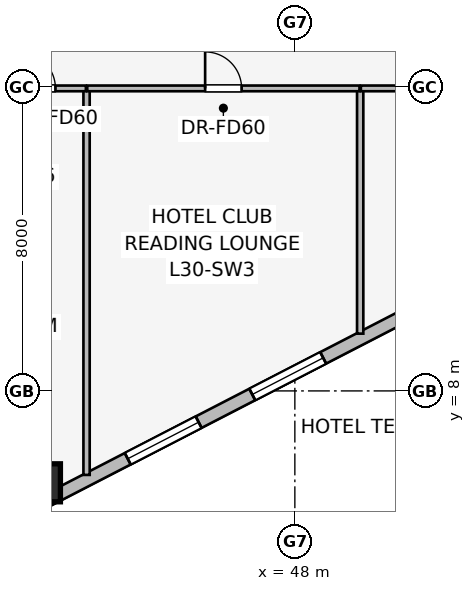
"""IFC4 building model, lengths in metres.
Left out: names, types, materials, properties, quantities, classifications, styles, units other than length and angle.
Written with IfcOpenShell. Run it as: python <this file> out.ifc"""

import sys

from ifc_helpers import new_model, si_unit, direction, frame, frame_2d, origin, origin_2d, place, context, subcontext, project, spatial, rectangle, extrude, element, fill, save


model = new_model("IFC4")
c1 = context("Model", 3, precision=1e-05, world=origin(), true_north=direction((0.0, 1.0)))
c2 = subcontext(c1, "Body", "Model", "MODEL_VIEW")
j1 = project(units=[si_unit("LENGTHUNIT", "METRE"), si_unit("PLANEANGLEUNIT", "RADIAN")], contexts=[c1])
p1 = place(None, origin())
s1 = spatial("IfcSite", under=j1, at=p1, CompositionType="ELEMENT")
p2 = place(p1, origin())
s2 = spatial("IfcBuilding", under=s1, at=p2, CompositionType="ELEMENT")
p3 = place(p2, frame((0.0, 0.0, 115.35)))
s3 = spatial("IfcBuildingStorey", under=s2, at=p3, CompositionType="ELEMENT", Elevation=115.35)
p4 = place(p3, frame((41.331, 5.582, 0.0), z_axis=(0.0, 0.0, 1.0), x_axis=(1.0, 0.0, 0.0)))
e1 = element("IfcColumn", 1, at=p4, inside=s3, PredefinedType="COLUMN", context=c2, shape_type="SweptSolid", body=[
    extrude(rectangle(XDim=1.0, YDim=1.0, at=origin_2d()), origin(), (0.0, 0.0, 1.0), 3.45),
])
p5 = place(p3, frame((54.831, 12.01, 0.0), z_axis=(0.0, 0.0, 1.0), x_axis=(-0.888613612362, -0.458656568606, 0.0)))
e2 = element("IfcWall", 2, at=p5, inside=s3, PredefinedType="STANDARD", context=c2, shape_type="SweptSolid", body=[
    extrude(rectangle(XDim=18.681, YDim=0.34, at=frame_2d((9.34, 0.0))), origin(), (0.0, 0.0, 1.0), 3.16),
])
p6 = place(p5, frame((1.023, 0.0, 0.75)))
e3 = element("IfcOpeningElement", 3, at=p6, cuts=e2, PredefinedType="OPENING", context=c2, shape_type="SweptSolid", body=[
    extrude(rectangle(XDim=1.6, YDim=1.55, at=frame_2d((0.8, 0.775))), frame((0.0, 0.18, 0.0), z_axis=(0.0, -1.0, 0.0), x_axis=(1.0, 0.0, 0.0)), (0.0, 0.0, 1.0), 0.36),
])
p7 = place(p5, frame((6.848, 0.0, 0.75)))
e4 = element("IfcOpeningElement", 4, at=p7, cuts=e2, PredefinedType="OPENING", context=c2, shape_type="SweptSolid", body=[
    extrude(rectangle(XDim=2.1, YDim=1.5, at=frame_2d((1.05, 0.75))), frame((0.0, 0.18, 0.0), z_axis=(0.0, -1.0, 0.0), x_axis=(1.0, 0.0, 0.0)), (0.0, 0.0, 1.0), 0.36),
])
p8 = place(p5, frame((10.536, 0.0, 0.75)))
e5 = element("IfcOpeningElement", 5, at=p8, cuts=e2, PredefinedType="OPENING", context=c2, shape_type="SweptSolid", body=[
    extrude(rectangle(XDim=2.1, YDim=1.5, at=frame_2d((1.05, 0.75))), frame((0.0, 0.18, 0.0), z_axis=(0.0, -1.0, 0.0), x_axis=(1.0, 0.0, 0.0)), (0.0, 0.0, 1.0), 0.36),
])
p9 = place(p5, frame((16.058, 0.0, 0.75)))
e6 = element("IfcOpeningElement", 6, at=p9, cuts=e2, PredefinedType="OPENING", context=c2, shape_type="SweptSolid", body=[
    extrude(rectangle(XDim=1.6, YDim=1.55, at=frame_2d((0.8, 0.775))), frame((0.0, 0.18, 0.0), z_axis=(0.0, -1.0, 0.0), x_axis=(1.0, 0.0, 0.0)), (0.0, 0.0, 1.0), 0.36),
])
p10 = place(p3, frame((42.519, 5.79, 0.0), z_axis=(0.0, 0.0, 1.0), x_axis=(0.0, 1.0, 0.0)))
e7 = element("IfcWall", 7, at=p10, inside=s3, PredefinedType="PARTITIONING", context=c2, shape_type="SweptSolid", body=[
    extrude(rectangle(XDim=10.14, YDim=0.165, at=frame_2d((5.07, 0.0))), origin(), (0.0, 0.0, 1.0), 3.16),
])
p11 = place(p3, frame((49.719, 9.507, 0.0), z_axis=(0.0, 0.0, 1.0), x_axis=(0.0, 1.0, 0.0)))
e8 = element("IfcWall", 8, at=p11, inside=s3, PredefinedType="PARTITIONING", context=c2, shape_type="SweptSolid", body=[
    extrude(rectangle(XDim=6.423, YDim=0.165, at=frame_2d((3.211, 0.0))), origin(), (0.0, 0.0, 1.0), 3.16),
])
p12 = place(p3, frame((37.738, 15.96, 0.0), z_axis=(0.0, 0.0, 1.0), x_axis=(1.0, 0.0, 0.0)))
e9 = element("IfcWall", 9, at=p12, inside=s3, PredefinedType="PARTITIONING", context=c2, shape_type="SweptSolid", body=[
    extrude(rectangle(XDim=4.763, YDim=0.15, at=frame_2d((2.381, 0.0))), origin(), (0.0, 0.0, 1.0), 3.16),
])
p13 = place(p12, frame((3.002, 0.0, 0.0)))
e10 = element("IfcOpeningElement", 10, at=p13, cuts=e9, PredefinedType="OPENING", context=c2, shape_type="SweptSolid", body=[
    extrude(rectangle(XDim=0.96, YDim=2.0, at=frame_2d((0.48, 1.0))), frame((0.0, 0.085, 0.0), z_axis=(0.0, -1.0, 0.0), x_axis=(1.0, 0.0, 0.0)), (0.0, 0.0, 1.0), 0.17),
])
p14 = place(p3, frame((42.537, 15.96, 0.0), z_axis=(0.0, 0.0, 1.0), x_axis=(1.0, 0.0, 0.0)))
e11 = element("IfcWall", 11, at=p14, inside=s3, PredefinedType="PARTITIONING", context=c2, shape_type="SweptSolid", body=[
    extrude(rectangle(XDim=7.164, YDim=0.15, at=frame_2d((3.582, 0.0))), origin(), (0.0, 0.0, 1.0), 3.16),
])
p15 = place(p14, frame((3.102, 0.0, 0.0)))
e12 = element("IfcOpeningElement", 12, at=p15, cuts=e11, PredefinedType="OPENING", context=c2, shape_type="SweptSolid", body=[
    extrude(rectangle(XDim=0.96, YDim=2.0, at=frame_2d((0.48, 1.0))), frame((0.0, 0.085, 0.0), z_axis=(0.0, -1.0, 0.0), x_axis=(1.0, 0.0, 0.0)), (0.0, 0.0, 1.0), 0.17),
])
p16 = place(p3, frame((49.737, 15.96, 0.0), z_axis=(0.0, 0.0, 1.0), x_axis=(1.0, 0.0, 0.0)))
e13 = element("IfcWall", 13, at=p16, inside=s3, PredefinedType="PARTITIONING", context=c2, shape_type="SweptSolid", body=[
    extrude(rectangle(XDim=7.471, YDim=0.15, at=frame_2d((3.735, 0.0))), origin(), (0.0, 0.0, 1.0), 3.16),
])
p17 = place(p16, frame((3.269, 0.0, 0.0)))
e14 = element("IfcOpeningElement", 14, at=p17, cuts=e13, PredefinedType="OPENING", context=c2, shape_type="SweptSolid", body=[
    extrude(rectangle(XDim=0.96, YDim=2.0, at=frame_2d((0.48, 1.0))), frame((0.0, 0.085, 0.0), z_axis=(0.0, -1.0, 0.0), x_axis=(1.0, 0.0, 0.0)), (0.0, 0.0, 1.0), 0.17),
])
p18 = place(p7, origin())
e15 = element("IfcWindow", 15, at=p18, inside=s3, PartitioningType="SINGLE_PANEL", PredefinedType="WINDOW", context=c2, shape_type="SweptSolid", body=[
    extrude(rectangle(XDim=2.1, YDim=1.5, at=frame_2d((1.05, 0.75))), frame((0.0, 0.03, 0.0), z_axis=(0.0, -1.0, 0.0), x_axis=(1.0, 0.0, 0.0)), (0.0, 0.0, 1.0), 0.06),
])
fill(e4, e15)
p19 = place(p8, origin())
e16 = element("IfcWindow", 16, at=p19, inside=s3, PartitioningType="SINGLE_PANEL", PredefinedType="WINDOW", context=c2, shape_type="SweptSolid", body=[
    extrude(rectangle(XDim=2.1, YDim=1.5, at=frame_2d((1.05, 0.75))), frame((0.0, 0.03, 0.0), z_axis=(0.0, -1.0, 0.0), x_axis=(1.0, 0.0, 0.0)), (0.0, 0.0, 1.0), 0.06),
])
fill(e5, e16)
p20 = place(p13, origin())
e17 = element("IfcDoor", 17, at=p20, inside=s3, OperationType="SINGLE_SWING_LEFT", PredefinedType="DOOR", context=c2, shape_type="SweptSolid", body=[
    extrude(rectangle(XDim=0.96, YDim=2.0, at=frame_2d((0.48, 1.0))), frame((0.0, 0.025, 0.0), z_axis=(0.0, -1.0, 0.0), x_axis=(1.0, 0.0, 0.0)), (0.0, 0.0, 1.0), 0.05),
])
fill(e10, e17)
p21 = place(p15, origin())
e18 = element("IfcDoor", 18, at=p21, inside=s3, OperationType="SINGLE_SWING_LEFT", PredefinedType="DOOR", context=c2, shape_type="SweptSolid", body=[
    extrude(rectangle(XDim=0.96, YDim=2.0, at=frame_2d((0.48, 1.0))), frame((0.0, 0.025, 0.0), z_axis=(0.0, -1.0, 0.0), x_axis=(1.0, 0.0, 0.0)), (0.0, 0.0, 1.0), 0.05),
])
fill(e12, e18)
save(model, sys.argv[1])
